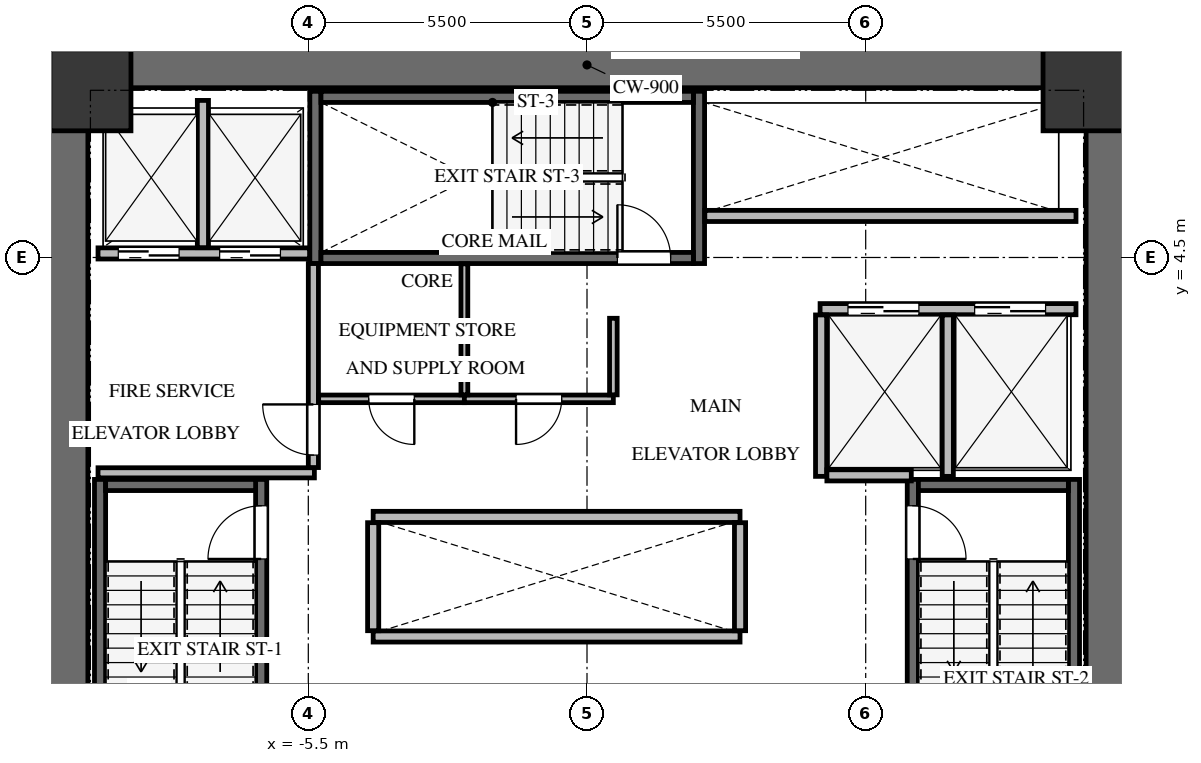
"""IFC4 building model, lengths in metres.
Left out: names, types, materials, properties, quantities, classifications, styles, units other than length and angle.
Written with IfcOpenShell. Run it as: python <this file> out.ifc"""

import sys

from ifc_helpers import new_model, si_unit, direction, frame, frame_2d, origin, origin_2d, place, context, subcontext, project, spatial, rectangle, extrude, source, transform, mapped, element, fill, save


model = new_model("IFC4")
c1 = context("Model", 3, precision=1e-05, world=origin(), true_north=direction((0.0, 1.0)))
c2 = subcontext(c1, "Body", "Model", "MODEL_VIEW")
j1 = project(units=[si_unit("LENGTHUNIT", "METRE"), si_unit("PLANEANGLEUNIT", "RADIAN")], contexts=[c1])
p1 = place(None, origin())
s1 = spatial("IfcSite", under=j1, at=p1, CompositionType="ELEMENT")
p2 = place(p1, origin())
s2 = spatial("IfcBuilding", under=s1, at=p2, CompositionType="ELEMENT")
p3 = place(p2, frame((0.0, 0.0, 35.7)))
s3 = spatial("IfcBuildingStorey", under=s2, at=p3, CompositionType="ELEMENT", Elevation=35.7)
for number, where, z_axis, x_axis in (
    (1, (-10.3, -8.75, 0.0), (0.0, 0.0, 1.0), (0.0, 1.0, 0.0)),
    (2, (10.3, -8.75, 0.0), (0.0, 0.0, 1.0), (0.0, 1.0, 0.0)),
):
    element("IfcWall", number, at=place(p3, frame(where, z_axis=z_axis, x_axis=x_axis)), inside=s3, PredefinedType="SHEAR", context=c2, shape_type="SweptSolid", body=[
        extrude(rectangle(XDim=17.5, YDim=0.9, at=frame_2d((8.75, 0.0))), origin(), (0.0, 0.0, 1.0), 3.3),
    ])
p4 = place(p3, frame((-9.85, 8.3, 0.0), z_axis=(0.0, 0.0, 1.0), x_axis=(1.0, 0.0, 0.0)))
e3 = element("IfcWall", 3, at=p4, inside=s3, PredefinedType="SHEAR", context=c2, shape_type="SweptSolid", body=[
    extrude(rectangle(XDim=19.7, YDim=0.9, at=frame_2d((9.85, 0.0))), origin(), (0.0, 0.0, 1.0), 3.3),
])
p5 = place(p3, frame((-6.43, -7.77, -0.24), z_axis=(0.0, 0.0, 1.0), x_axis=(0.0, 1.0, 0.0)))
e4 = element("IfcWall", 4, at=p5, inside=s3, PredefinedType="SHEAR", context=c2, shape_type="SweptSolid", body=[
    extrude(rectangle(XDim=7.89, YDim=0.22, at=frame_2d((3.945, 0.0))), origin(), (0.0, 0.0, 1.0), 3.3),
])
p6 = place(p5, frame((6.32, 0.0, 0.0)))
e5 = element("IfcOpeningElement", 5, at=p6, cuts=e4, PredefinedType="OPENING", context=c2, shape_type="SweptSolid", body=[
    extrude(rectangle(XDim=1.05, YDim=2.15, at=frame_2d((0.525, 1.075))), frame((0.0, 0.12, 0.0), z_axis=(0.0, -1.0, 0.0), x_axis=(1.0, 0.0, 0.0)), (0.0, 0.0, 1.0), 0.24),
])
p7 = place(p3, frame((-9.61, 0.12, -0.24), z_axis=(0.0, 0.0, 1.0), x_axis=(0.0, -1.0, 0.0)))
e6 = element("IfcWall", 6, at=p7, inside=s3, PredefinedType="SHEAR", context=c2, shape_type="SweptSolid", body=[
    extrude(rectangle(XDim=7.89, YDim=0.22, at=frame_2d((3.945, 0.0))), origin(), (0.0, 0.0, 1.0), 3.3),
])
p8 = place(p3, frame((-6.54, 0.01, -0.24), z_axis=(0.0, 0.0, 1.0), x_axis=(-1.0, 0.0, 0.0)))
e7 = element("IfcWall", 7, at=p8, inside=s3, PredefinedType="SHEAR", context=c2, shape_type="SweptSolid", body=[
    extrude(rectangle(XDim=2.96, YDim=0.22, at=frame_2d((1.48, 0.0))), origin(), (0.0, 0.0, 1.0), 3.3),
])
p9 = place(p3, frame((9.61, -7.77, -0.24), z_axis=(0.0, 0.0, 1.0), x_axis=(0.0, 1.0, 0.0)))
e8 = element("IfcWall", 8, at=p9, inside=s3, PredefinedType="SHEAR", context=c2, shape_type="SweptSolid", body=[
    extrude(rectangle(XDim=7.89, YDim=0.22, at=frame_2d((3.945, 0.0))), origin(), (0.0, 0.0, 1.0), 3.3),
])
p10 = place(p3, frame((6.43, 0.12, -0.24), z_axis=(0.0, 0.0, 1.0), x_axis=(0.0, -1.0, 0.0)))
e9 = element("IfcWall", 9, at=p10, inside=s3, PredefinedType="SHEAR", context=c2, shape_type="SweptSolid", body=[
    extrude(rectangle(XDim=7.89, YDim=0.22, at=frame_2d((3.945, 0.0))), origin(), (0.0, 0.0, 1.0), 3.3),
])
p11 = place(p10, frame((0.52, 0.0, 0.0)))
e10 = element("IfcOpeningElement", 10, at=p11, cuts=e9, PredefinedType="OPENING", context=c2, shape_type="SweptSolid", body=[
    extrude(rectangle(XDim=1.05, YDim=2.15, at=frame_2d((0.525, 1.075))), frame((0.0, 0.12, 0.0), z_axis=(0.0, -1.0, 0.0), x_axis=(1.0, 0.0, 0.0)), (0.0, 0.0, 1.0), 0.24),
])
p12 = place(p3, frame((9.5, 0.01, -0.24), z_axis=(0.0, 0.0, 1.0), x_axis=(-1.0, 0.0, 0.0)))
e11 = element("IfcWall", 11, at=p12, inside=s3, PredefinedType="SHEAR", context=c2, shape_type="SweptSolid", body=[
    extrude(rectangle(XDim=2.96, YDim=0.22, at=frame_2d((1.48, 0.0))), origin(), (0.0, 0.0, 1.0), 3.3),
])
for number, where, z_axis, x_axis in (
    (12, (2.21, 4.38, -0.24), (0.0, 0.0, 1.0), (0.0, 1.0, 0.0)),
    (13, (-5.36, 7.78, -0.24), (0.0, 0.0, 1.0), (0.0, -1.0, 0.0)),
):
    element("IfcWall", number, at=place(p3, frame(where, z_axis=z_axis, x_axis=x_axis)), inside=s3, PredefinedType="SHEAR", context=c2, shape_type="SweptSolid", body=[
        extrude(rectangle(XDim=3.4, YDim=0.22, at=frame_2d((1.7, 0.0))), origin(), (0.0, 0.0, 1.0), 3.3),
    ])
p13 = place(p3, frame((-5.25, 4.49, -0.24), z_axis=(0.0, 0.0, 1.0), x_axis=(1.0, 0.0, 0.0)))
e14 = element("IfcWall", 14, at=p13, inside=s3, PredefinedType="SHEAR", context=c2, shape_type="SweptSolid", body=[
    extrude(rectangle(XDim=7.35, YDim=0.22, at=frame_2d((3.675, 0.0))), origin(), (0.0, 0.0, 1.0), 3.3),
])
p14 = place(p13, frame((5.85, 0.0, 0.0)))
e15 = element("IfcOpeningElement", 15, at=p14, cuts=e14, PredefinedType="OPENING", context=c2, shape_type="SweptSolid", body=[
    extrude(rectangle(XDim=1.05, YDim=2.15, at=frame_2d((0.525, 1.075))), frame((0.0, 0.12, 0.0), z_axis=(0.0, -1.0, 0.0), x_axis=(1.0, 0.0, 0.0)), (0.0, 0.0, 1.0), 0.24),
])
p15 = place(p3, frame((2.1, 7.67, -0.24), z_axis=(0.0, 0.0, 1.0), x_axis=(-1.0, 0.0, 0.0)))
e16 = element("IfcWall", 16, at=p15, inside=s3, PredefinedType="SHEAR", context=c2, shape_type="SweptSolid", body=[
    extrude(rectangle(XDim=7.35, YDim=0.22, at=frame_2d((3.675, 0.0))), origin(), (0.0, 0.0, 1.0), 3.3),
])
m1 = source(origin(), c2, "Body", "SweptSolid", [
    extrude(rectangle(XDim=1.6, YDim=1.6, at=origin_2d()), origin(), (0.0, 0.0, 1.0), 3.3),
])
for number, where, z_axis, x_axis in (
    (17, (9.8, 7.8, -0.24), (0.0, 0.0, 1.0), (1.0, 0.0, 0.0)),
    (18, (-9.8, 7.8, -0.24), (0.0, 0.0, 1.0), (1.0, 0.0, 0.0)),
):
    element("IfcColumn", number, at=place(p3, frame(where, z_axis=z_axis, x_axis=x_axis)), inside=s3, PredefinedType="COLUMN", context=c2, shape_type="MappedRepresentation", body=[
        mapped(m1, transform((0.0, 0.0, 0.0), x_axis=(1.0, 0.0, 0.0), y_axis=(0.0, 1.0, 0.0), z_axis=(0.0, 0.0, 1.0), scale=1.0)),
    ])
p16 = place(p3, frame((-9.65, 4.58, 0.0), z_axis=(0.0, 0.0, 1.0), x_axis=(1.0, 0.0, 0.0)))
e19 = element("IfcWall", 19, at=p16, inside=s3, PredefinedType="SOLIDWALL", context=c2, shape_type="SweptSolid", body=[
    extrude(rectangle(XDim=4.175, YDim=0.22, at=frame_2d((2.087, 0.0))), origin(), (0.0, 0.0, 1.0), 3.045),
])
p17 = place(p16, frame((0.4, 0.0, 0.0)))
e20 = element("IfcOpeningElement", 20, at=p17, cuts=e19, PredefinedType="OPENING", context=c2, shape_type="SweptSolid", body=[
    extrude(rectangle(XDim=1.2, YDim=2.15, at=frame_2d((0.6, 1.075))), frame((0.0, 0.12, 0.0), z_axis=(0.0, -1.0, 0.0), x_axis=(1.0, 0.0, 0.0)), (0.0, 0.0, 1.0), 0.24),
])
p18 = place(p16, frame((2.4, 0.0, 0.0)))
e21 = element("IfcOpeningElement", 21, at=p18, cuts=e19, PredefinedType="OPENING", context=c2, shape_type="SweptSolid", body=[
    extrude(rectangle(XDim=1.2, YDim=2.15, at=frame_2d((0.6, 1.075))), frame((0.0, 0.12, 0.0), z_axis=(0.0, -1.0, 0.0), x_axis=(1.0, 0.0, 0.0)), (0.0, 0.0, 1.0), 0.24),
])
p19 = place(p3, frame((-7.58, 4.694, 0.0), z_axis=(0.0, 0.0, 1.0), x_axis=(0.0, 1.0, 0.0)))
e22 = element("IfcWall", 22, at=p19, inside=s3, PredefinedType="SOLIDWALL", context=c2, shape_type="SweptSolid", body=[
    extrude(rectangle(XDim=2.906, YDim=0.22, at=frame_2d((1.453, 0.0))), origin(), (0.0, 0.0, 1.0), 3.045),
])
p20 = place(p3, frame((-9.65, 0.25, 0.0), z_axis=(0.0, 0.0, 1.0), x_axis=(1.0, 0.0, 0.0)))
e23 = element("IfcWall", 23, at=p20, inside=s3, PredefinedType="SOLIDWALL", context=c2, shape_type="SweptSolid", body=[
    extrude(rectangle(XDim=4.27, YDim=0.2, at=frame_2d((2.135, 0.0))), origin(), (0.0, 0.0, 1.0), 3.045),
])
p21 = place(p3, frame((-5.4, 0.354, 0.0), z_axis=(0.0, 0.0, 1.0), x_axis=(0.0, 1.0, 0.0)))
e24 = element("IfcWall", 24, at=p21, inside=s3, PredefinedType="SOLIDWALL", context=c2, shape_type="SweptSolid", body=[
    extrude(rectangle(XDim=4.026, YDim=0.2, at=frame_2d((2.013, 0.0))), origin(), (0.0, 0.0, 1.0), 3.045),
])
p22 = place(p21, frame((0.246, 0.0, 0.0)))
e25 = element("IfcOpeningElement", 25, at=p22, cuts=e24, PredefinedType="OPENING", context=c2, shape_type="SweptSolid", body=[
    extrude(rectangle(XDim=1.0, YDim=2.15, at=frame_2d((0.5, 1.075))), frame((0.0, 0.11, 0.0), z_axis=(0.0, -1.0, 0.0), x_axis=(1.0, 0.0, 0.0)), (0.0, 0.0, 1.0), 0.22),
])
p23 = place(p3, frame((4.6, 3.48, 0.0), z_axis=(0.0, 0.0, 1.0), x_axis=(1.0, 0.0, 0.0)))
e26 = element("IfcWall", 26, at=p23, inside=s3, PredefinedType="SOLIDWALL", context=c2, shape_type="SweptSolid", body=[
    extrude(rectangle(XDim=5.05, YDim=0.22, at=frame_2d((2.525, 0.0))), origin(), (0.0, 0.0, 1.0), 3.045),
])
p24 = place(p23, frame((0.55, 0.0, 0.0)))
e27 = element("IfcOpeningElement", 27, at=p24, cuts=e26, PredefinedType="OPENING", context=c2, shape_type="SweptSolid", body=[
    extrude(rectangle(XDim=1.4, YDim=2.15, at=frame_2d((0.7, 1.075))), frame((0.0, 0.12, 0.0), z_axis=(0.0, -1.0, 0.0), x_axis=(1.0, 0.0, 0.0)), (0.0, 0.0, 1.0), 0.24),
])
p25 = place(p23, frame((3.05, 0.0, 0.0)))
e28 = element("IfcOpeningElement", 28, at=p25, cuts=e26, PredefinedType="OPENING", context=c2, shape_type="SweptSolid", body=[
    extrude(rectangle(XDim=1.4, YDim=2.15, at=frame_2d((0.7, 1.075))), frame((0.0, 0.12, 0.0), z_axis=(0.0, -1.0, 0.0), x_axis=(1.0, 0.0, 0.0)), (0.0, 0.0, 1.0), 0.24),
])
for number, where, z_axis, x_axis in (
    (29, (4.62, 0.18, 0.0), (0.0, 0.0, 1.0), (0.0, 1.0, 0.0)),
    (30, (7.12, 0.18, 0.0), (0.0, 0.0, 1.0), (0.0, 1.0, 0.0)),
):
    element("IfcWall", number, at=place(p3, frame(where, z_axis=z_axis, x_axis=x_axis)), inside=s3, PredefinedType="SOLIDWALL", context=c2, shape_type="SweptSolid", body=[
        extrude(rectangle(XDim=3.186, YDim=0.22, at=frame_2d((1.593, 0.0))), origin(), (0.0, 0.0, 1.0), 3.045),
    ])
p26 = place(p3, frame((4.734, 0.2, 0.0), z_axis=(0.0, 0.0, 1.0), x_axis=(1.0, 0.0, 0.0)))
e31 = element("IfcWall", 31, at=p26, inside=s3, PredefinedType="SOLIDWALL", context=c2, shape_type="SweptSolid", body=[
    extrude(rectangle(XDim=1.666, YDim=0.22, at=frame_2d((0.833, 0.0))), origin(), (0.0, 0.0, 1.0), 3.045),
])
for number, where, z_axis, x_axis in (
    (32, (-4.22, -2.98, 0.0), (0.0, 0.0, 1.0), (1.0, 0.0, 0.0)),
    (33, (-4.22, -0.62, 0.0), (0.0, 0.0, 1.0), (1.0, 0.0, 0.0)),
):
    element("IfcWall", number, at=place(p3, frame(where, z_axis=z_axis, x_axis=x_axis)), inside=s3, PredefinedType="SOLIDWALL", context=c2, shape_type="SweptSolid", body=[
        extrude(rectangle(XDim=7.24, YDim=0.22, at=frame_2d((3.62, 0.0))), origin(), (0.0, 0.0, 1.0), 3.045),
    ])
for number, where, z_axis, x_axis in (
    (34, (-4.22, -2.866, 0.0), (0.0, 0.0, 1.0), (0.0, 1.0, 0.0)),
    (35, (3.02, -2.866, 0.0), (0.0, 0.0, 1.0), (0.0, 1.0, 0.0)),
):
    element("IfcWall", number, at=place(p3, frame(where, z_axis=z_axis, x_axis=x_axis)), inside=s3, PredefinedType="SOLIDWALL", context=c2, shape_type="SweptSolid", body=[
        extrude(rectangle(XDim=2.132, YDim=0.22, at=frame_2d((1.066, 0.0))), origin(), (0.0, 0.0, 1.0), 3.045),
    ])
p27 = place(p3, frame((2.325, 5.32, 0.0), z_axis=(0.0, 0.0, 1.0), x_axis=(1.0, 0.0, 0.0)))
e36 = element("IfcWall", 36, at=p27, inside=s3, PredefinedType="SOLIDWALL", context=c2, shape_type="SweptSolid", body=[
    extrude(rectangle(XDim=7.325, YDim=0.22, at=frame_2d((3.663, 0.0))), origin(), (0.0, 0.0, 1.0), 3.045),
])
p28 = place(p3, frame((-2.42, 1.71, 0.0), z_axis=(0.0, 0.0, 1.0), x_axis=(-1.0, 0.0, 0.0)))
e37 = element("IfcWall", 37, at=p28, inside=s3, PredefinedType="PARTITIONING", context=c2, shape_type="SweptSolid", body=[
    extrude(rectangle(XDim=2.876, YDim=0.15, at=frame_2d((1.438, 0.0))), origin(), (0.0, 0.0, 1.0), 3.045),
])
p29 = place(p28, frame((0.988, 0.0, 0.0)))
e38 = element("IfcOpeningElement", 38, at=p29, cuts=e37, PredefinedType="OPENING", context=c2, shape_type="SweptSolid", body=[
    extrude(rectangle(XDim=0.9, YDim=2.05, at=frame_2d((0.45, 1.025))), frame((0.0, 0.085, 0.0), z_axis=(0.0, -1.0, 0.0), x_axis=(1.0, 0.0, 0.0)), (0.0, 0.0, 1.0), 0.17),
])
p30 = place(p3, frame((0.52, 1.71, 0.0), z_axis=(0.0, 0.0, 1.0), x_axis=(-1.0, 0.0, 0.0)))
e39 = element("IfcWall", 39, at=p30, inside=s3, PredefinedType="PARTITIONING", context=c2, shape_type="SweptSolid", body=[
    extrude(rectangle(XDim=2.94, YDim=0.15, at=frame_2d((1.47, 0.0))), origin(), (0.0, 0.0, 1.0), 3.045),
])
p31 = place(p30, frame((1.02, 0.0, 0.0)))
e40 = element("IfcOpeningElement", 40, at=p31, cuts=e39, PredefinedType="OPENING", context=c2, shape_type="SweptSolid", body=[
    extrude(rectangle(XDim=0.9, YDim=2.05, at=frame_2d((0.45, 1.025))), frame((0.0, 0.085, 0.0), z_axis=(0.0, -1.0, 0.0), x_axis=(1.0, 0.0, 0.0)), (0.0, 0.0, 1.0), 0.17),
])
p32 = place(p3, frame((0.52, 3.3, 0.0), z_axis=(0.0, 0.0, 1.0), x_axis=(0.0, -1.0, 0.0)))
e41 = element("IfcWall", 41, at=p32, inside=s3, PredefinedType="PARTITIONING", context=c2, shape_type="SweptSolid", body=[
    extrude(rectangle(XDim=1.511, YDim=0.15, at=frame_2d((0.755, 0.0))), origin(), (0.0, 0.0, 1.0), 3.045),
])
p33 = place(p3, frame((-2.42, 4.375, 0.0), z_axis=(0.0, 0.0, 1.0), x_axis=(0.0, -1.0, 0.0)))
e42 = element("IfcWall", 42, at=p33, inside=s3, PredefinedType="PARTITIONING", context=c2, shape_type="SweptSolid", body=[
    extrude(rectangle(XDim=2.586, YDim=0.135, at=frame_2d((1.293, 0.0))), origin(), (0.0, 0.0, 1.0), 3.045),
])
m2 = source(origin(), c2, "Body", "SweptSolid", [
    extrude(rectangle(XDim=1.05, YDim=2.15, at=frame_2d((0.525, 1.075))), frame((0.0, 0.025, 0.0), z_axis=(0.0, -1.0, 0.0), x_axis=(1.0, 0.0, 0.0)), (0.0, 0.0, 1.0), 0.05),
])
p34 = place(p6, origin())
e43 = element("IfcDoor", 43, at=p34, inside=s3, OperationType="SINGLE_SWING_LEFT", PredefinedType="DOOR", context=c2, shape_type="MappedRepresentation", body=[
    mapped(m2, transform((0.0, 0.0, 0.0), x_axis=(1.0, 0.0, 0.0), y_axis=(0.0, 1.0, 0.0), z_axis=(0.0, 0.0, 1.0), scale=1.0)),
])
fill(e5, e43)
m3 = source(origin(), c2, "Body", "SweptSolid", [
    extrude(rectangle(XDim=1.05, YDim=2.15, at=frame_2d((0.525, 1.075))), frame((0.0, 0.025, 0.0), z_axis=(0.0, -1.0, 0.0), x_axis=(1.0, 0.0, 0.0)), (0.0, 0.0, 1.0), 0.05),
])
p35 = place(p11, origin())
e44 = element("IfcDoor", 44, at=p35, inside=s3, OperationType="SINGLE_SWING_RIGHT", PredefinedType="DOOR", context=c2, shape_type="MappedRepresentation", body=[
    mapped(m3, transform((0.0, 0.0, 0.0), x_axis=(1.0, 0.0, 0.0), y_axis=(0.0, 1.0, 0.0), z_axis=(0.0, 0.0, 1.0), scale=1.0)),
])
fill(e10, e44)
p36 = place(p14, origin())
e45 = element("IfcDoor", 45, at=p36, inside=s3, OperationType="SINGLE_SWING_LEFT", PredefinedType="DOOR", context=c2, shape_type="MappedRepresentation", body=[
    mapped(m2, transform((0.0, 0.0, 0.0), x_axis=(1.0, 0.0, 0.0), y_axis=(0.0, 1.0, 0.0), z_axis=(0.0, 0.0, 1.0), scale=1.0)),
])
fill(e15, e45)
m4 = source(origin(), c2, "Body", "SweptSolid", [
    extrude(rectangle(XDim=1.2, YDim=2.15, at=frame_2d((0.6, 1.075))), frame((0.0, 0.025, 0.0), z_axis=(0.0, -1.0, 0.0), x_axis=(1.0, 0.0, 0.0)), (0.0, 0.0, 1.0), 0.05),
])
p37 = place(p17, origin())
e46 = element("IfcDoor", 46, at=p37, inside=s3, OperationType="DOUBLE_DOOR_SLIDING", PredefinedType="DOOR", context=c2, shape_type="MappedRepresentation", body=[
    mapped(m4, transform((0.0, 0.0, 0.0), x_axis=(1.0, 0.0, 0.0), y_axis=(0.0, 1.0, 0.0), z_axis=(0.0, 0.0, 1.0), scale=1.0)),
])
fill(e20, e46)
p38 = place(p18, origin())
e47 = element("IfcDoor", 47, at=p38, inside=s3, OperationType="DOUBLE_DOOR_SLIDING", PredefinedType="DOOR", context=c2, shape_type="MappedRepresentation", body=[
    mapped(m4, transform((0.0, 0.0, 0.0), x_axis=(1.0, 0.0, 0.0), y_axis=(0.0, 1.0, 0.0), z_axis=(0.0, 0.0, 1.0), scale=1.0)),
])
fill(e21, e47)
m5 = source(origin(), c2, "Body", "SweptSolid", [
    extrude(rectangle(XDim=1.0, YDim=2.15, at=frame_2d((0.5, 1.075))), frame((0.0, 0.025, 0.0), z_axis=(0.0, -1.0, 0.0), x_axis=(1.0, 0.0, 0.0)), (0.0, 0.0, 1.0), 0.05),
])
p39 = place(p22, origin())
e48 = element("IfcDoor", 48, at=p39, inside=s3, OperationType="SINGLE_SWING_RIGHT", PredefinedType="DOOR", context=c2, shape_type="MappedRepresentation", body=[
    mapped(m5, transform((0.0, 0.0, 0.0), x_axis=(1.0, 0.0, 0.0), y_axis=(0.0, 1.0, 0.0), z_axis=(0.0, 0.0, 1.0), scale=1.0)),
])
fill(e25, e48)
m6 = source(origin(), c2, "Body", "SweptSolid", [
    extrude(rectangle(XDim=1.4, YDim=2.15, at=frame_2d((0.7, 1.075))), frame((0.0, 0.025, 0.0), z_axis=(0.0, -1.0, 0.0), x_axis=(1.0, 0.0, 0.0)), (0.0, 0.0, 1.0), 0.05),
])
p40 = place(p24, origin())
e49 = element("IfcDoor", 49, at=p40, inside=s3, OperationType="DOUBLE_DOOR_SLIDING", PredefinedType="DOOR", context=c2, shape_type="MappedRepresentation", body=[
    mapped(m6, transform((0.0, 0.0, 0.0), x_axis=(1.0, 0.0, 0.0), y_axis=(0.0, 1.0, 0.0), z_axis=(0.0, 0.0, 1.0), scale=1.0)),
])
fill(e27, e49)
p41 = place(p25, origin())
e50 = element("IfcDoor", 50, at=p41, inside=s3, OperationType="DOUBLE_DOOR_SLIDING", PredefinedType="DOOR", context=c2, shape_type="MappedRepresentation", body=[
    mapped(m6, transform((0.0, 0.0, 0.0), x_axis=(1.0, 0.0, 0.0), y_axis=(0.0, 1.0, 0.0), z_axis=(0.0, 0.0, 1.0), scale=1.0)),
])
fill(e28, e50)
m7 = source(origin(), c2, "Body", "SweptSolid", [
    extrude(rectangle(XDim=0.9, YDim=2.05, at=frame_2d((0.45, 1.025))), frame((0.0, 0.025, 0.0), z_axis=(0.0, -1.0, 0.0), x_axis=(1.0, 0.0, 0.0)), (0.0, 0.0, 1.0), 0.05),
])
p42 = place(p29, origin())
e51 = element("IfcDoor", 51, at=p42, inside=s3, OperationType="SINGLE_SWING_LEFT", PredefinedType="DOOR", context=c2, shape_type="MappedRepresentation", body=[
    mapped(m7, transform((0.0, 0.0, 0.0), x_axis=(1.0, 0.0, 0.0), y_axis=(0.0, 1.0, 0.0), z_axis=(0.0, 0.0, 1.0), scale=1.0)),
])
fill(e38, e51)
m8 = source(origin(), c2, "Body", "SweptSolid", [
    extrude(rectangle(XDim=0.9, YDim=2.05, at=frame_2d((0.45, 1.025))), frame((0.0, 0.025, 0.0), z_axis=(0.0, -1.0, 0.0), x_axis=(1.0, 0.0, 0.0)), (0.0, 0.0, 1.0), 0.05),
])
p43 = place(p31, origin())
e52 = element("IfcDoor", 52, at=p43, inside=s3, OperationType="SINGLE_SWING_RIGHT", PredefinedType="DOOR", context=c2, shape_type="MappedRepresentation", body=[
    mapped(m8, transform((0.0, 0.0, 0.0), x_axis=(1.0, 0.0, 0.0), y_axis=(0.0, 1.0, 0.0), z_axis=(0.0, 0.0, 1.0), scale=1.0)),
])
fill(e40, e52)
save(model, sys.argv[1])
